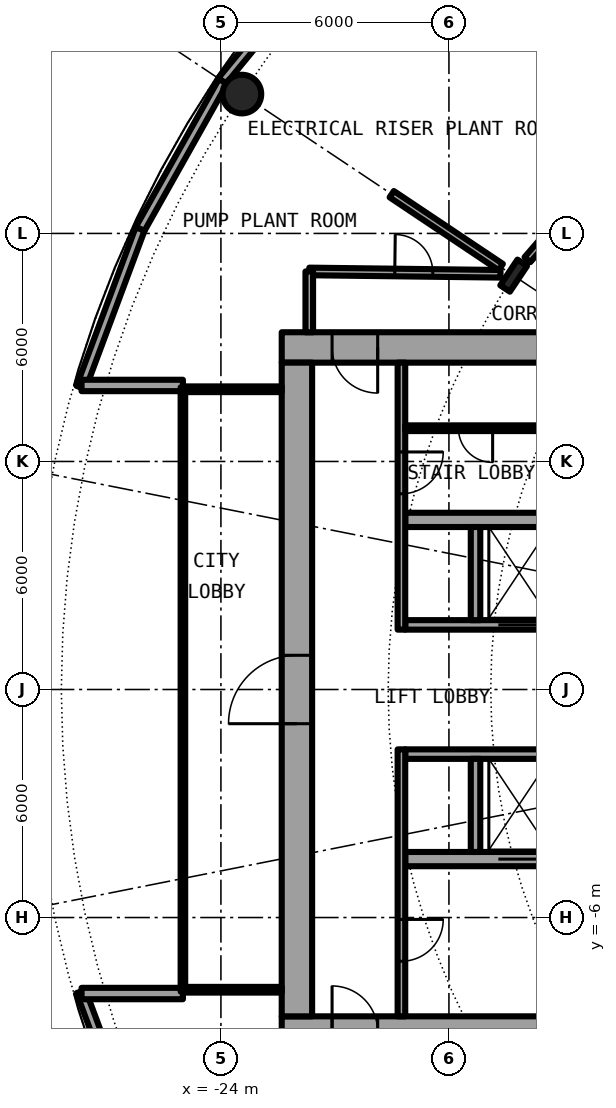
"""IFC4 building model, lengths in metres.
Left out: names, types, materials, properties, quantities, classifications, styles, units other than length and angle.
Written with IfcOpenShell. Run it as: python <this file> out.ifc"""

import sys

from ifc_helpers import new_model, si_unit, direction, frame, frame_2d, origin, origin_2d, place, context, subcontext, project, spatial, rectangle, hollow_circle, i_section, extrude, element, fill, save


model = new_model("IFC4")
c1 = context("Model", 3, precision=1e-05, world=origin(), true_north=direction((0.0, 1.0)))
c2 = subcontext(c1, "Body", "Model", "MODEL_VIEW")
j1 = project(units=[si_unit("LENGTHUNIT", "METRE"), si_unit("PLANEANGLEUNIT", "RADIAN")], contexts=[c1])
p1 = place(None, origin())
s1 = spatial("IfcSite", under=j1, at=p1, CompositionType="ELEMENT")
p2 = place(p1, origin())
s2 = spatial("IfcBuilding", under=s1, at=p2, CompositionType="ELEMENT")
p3 = place(p2, frame((0.0, 0.0, 18.3)))
s3 = spatial("IfcBuildingStorey", under=s2, at=p3, CompositionType="ELEMENT", Elevation=18.3)
p4 = place(p3, frame((-23.448, 15.667, 0.0), z_axis=(0.0, 0.0, 1.0), x_axis=(1.0, 0.0, 0.0)))
e1 = element("IfcColumn", 1, at=p4, inside=s3, PredefinedType="COLUMN", context=c2, shape_type="SweptSolid", body=[
    extrude(hollow_circle(Radius=0.508, WallThickness=0.05, at=origin_2d()), origin(), (0.0, 0.0, 1.0), 4.5),
])
p5 = place(p3, frame((-16.297, 10.889, 0.0), z_axis=(0.0, 0.0, 1.0), x_axis=(-0.831469612303, 0.55557023302, 0.0)))
e2 = element("IfcColumn", 2, at=p5, inside=s3, PredefinedType="COLUMN", context=c2, shape_type="SweptSolid", body=[
    extrude(i_section(OverallWidth=0.303, OverallDepth=0.814, WebThickness=0.021, FlangeThickness=0.04, FilletRadius=0.03, at=origin_2d()), origin(), (0.0, 0.0, 1.0), 4.5),
])
p6 = place(p3, frame((-20.382, 20.382, 0.0), z_axis=(0.0, 0.0, 1.0), x_axis=(-0.634403999748, -0.773001659186, 0.0)))
e3 = element("IfcWall", 3, at=p6, inside=s3, PredefinedType="SOLIDWALL", context=c2, shape_type="SweptSolid", body=[
    extrude(rectangle(XDim=5.651, YDim=0.25, at=frame_2d((2.825, 0.0))), origin(), (0.0, 0.0, 1.0), 4.15),
])
p7 = place(p3, frame((-27.682, -7.945, 0.0), z_axis=(0.0, 0.0, 1.0), x_axis=(0.349247811493, -0.937030397675, 0.0)))
e4 = element("IfcWall", 4, at=p7, inside=s3, PredefinedType="SOLIDWALL", context=c2, shape_type="SweptSolid", body=[
    extrude(rectangle(XDim=4.452, YDim=0.25, at=frame_2d((2.226, 0.0))), origin(), (0.0, 0.0, 1.0), 4.15),
])
p8 = place(p3, frame((-23.946, 16.0, 0.0), z_axis=(0.0, 0.0, 1.0), x_axis=(-0.489696356642, -0.871893042919, 0.0)))
e5 = element("IfcWall", 5, at=p8, inside=s3, PredefinedType="SOLIDWALL", context=c2, shape_type="SweptSolid", body=[
    extrude(rectangle(XDim=4.454, YDim=0.25, at=frame_2d((2.227, 0.0))), origin(), (0.0, 0.0, 1.0), 4.15),
])
p9 = place(p3, frame((-26.127, 12.117, 0.0), z_axis=(0.0, 0.0, 1.0), x_axis=(-0.349247811493, -0.937030397675, 0.0)))
e6 = element("IfcWall", 6, at=p9, inside=s3, PredefinedType="SOLIDWALL", context=c2, shape_type="SweptSolid", body=[
    extrude(rectangle(XDim=4.452, YDim=0.25, at=frame_2d((2.226, 0.0))), origin(), (0.0, 0.0, 1.0), 4.15),
])
for number, where, z_axis, x_axis in (
    (7, (-25.0, 8.0, 0.0), (0.0, 0.0, 1.0), (-1.0, 0.0, 0.0)),
    (8, (-25.0, -8.0, 0.0), (0.0, 0.0, 1.0), (-1.0, 0.0, 0.0)),
):
    element("IfcWall", number, at=place(p3, frame(where, z_axis=z_axis, x_axis=x_axis)), inside=s3, PredefinedType="SOLIDWALL", context=c2, shape_type="SweptSolid", body=[
        extrude(rectangle(XDim=2.667, YDim=0.3, at=frame_2d((1.333, 0.0))), origin(), (0.0, 0.0, 1.0), 4.15),
    ])
p10 = place(p3, frame((-22.4, -9.0, 0.0), z_axis=(0.0, 0.0, 1.0), x_axis=(1.0, 0.0, 0.0)))
e9 = element("IfcWall", 9, at=p10, inside=s3, PredefinedType="SHEAR", context=c2, shape_type="SweptSolid", body=[
    extrude(rectangle(XDim=14.2, YDim=0.8, at=frame_2d((7.1, 0.0))), origin(), (0.0, 0.0, 1.0), 4.5),
])
p11 = place(p10, frame((1.325, 0.0, 0.0)))
e10 = element("IfcOpeningElement", 10, at=p11, cuts=e9, PredefinedType="OPENING", context=c2, shape_type="SweptSolid", body=[
    extrude(rectangle(XDim=1.2, YDim=2.3, at=frame_2d((0.6, 1.15))), frame((0.0, 0.41, 0.0), z_axis=(0.0, -1.0, 0.0), x_axis=(1.0, 0.0, 0.0)), (0.0, 0.0, 1.0), 0.82),
])
p12 = place(p3, frame((-8.2, 9.0, 0.0), z_axis=(0.0, 0.0, 1.0), x_axis=(-1.0, 0.0, 0.0)))
e11 = element("IfcWall", 11, at=p12, inside=s3, PredefinedType="SHEAR", context=c2, shape_type="SweptSolid", body=[
    extrude(rectangle(XDim=14.2, YDim=0.8, at=frame_2d((7.1, 0.0))), origin(), (0.0, 0.0, 1.0), 4.5),
])
p13 = place(p12, frame((11.675, 0.0, 0.0)))
e12 = element("IfcOpeningElement", 12, at=p13, cuts=e11, PredefinedType="OPENING", context=c2, shape_type="SweptSolid", body=[
    extrude(rectangle(XDim=1.2, YDim=2.3, at=frame_2d((0.6, 1.15))), frame((0.0, 0.41, 0.0), z_axis=(0.0, -1.0, 0.0), x_axis=(1.0, 0.0, 0.0)), (0.0, 0.0, 1.0), 0.82),
])
p14 = place(p3, frame((-22.0, -8.6, 0.0), z_axis=(0.0, 0.0, 1.0), x_axis=(0.0, 1.0, 0.0)))
e13 = element("IfcWall", 13, at=p14, inside=s3, PredefinedType="SHEAR", context=c2, shape_type="SweptSolid", body=[
    extrude(rectangle(XDim=17.2, YDim=0.8, at=frame_2d((8.6, 0.0))), origin(), (0.0, 0.0, 1.0), 4.5),
])
p15 = place(p14, frame((7.7, 0.0, 0.0)))
e14 = element("IfcOpeningElement", 14, at=p15, cuts=e13, PredefinedType="OPENING", context=c2, shape_type="SweptSolid", body=[
    extrude(rectangle(XDim=1.8, YDim=2.3, at=frame_2d((0.9, 1.15))), frame((0.0, 0.41, 0.0), z_axis=(0.0, -1.0, 0.0), x_axis=(1.0, 0.0, 0.0)), (0.0, 0.0, 1.0), 0.82),
])
p16 = place(p3, frame((-9.0, -1.7, 0.0), z_axis=(0.0, 0.0, 1.0), x_axis=(-1.0, 0.0, 0.0)))
e15 = element("IfcWall", 15, at=p16, inside=s3, PredefinedType="SHEAR", context=c2, shape_type="SweptSolid", body=[
    extrude(rectangle(XDim=10.15, YDim=0.25, at=frame_2d((5.075, 0.0))), origin(), (0.0, 0.0, 1.0), 4.5),
])
p17 = place(p16, frame((0.387, 0.0, 0.0)))
e16 = element("IfcOpeningElement", 16, at=p17, cuts=e15, PredefinedType="OPENING", context=c2, shape_type="SweptSolid", body=[
    extrude(rectangle(XDim=1.1, YDim=2.3, at=frame_2d((0.55, 1.15))), frame((0.0, 0.135, 0.0), z_axis=(0.0, -1.0, 0.0), x_axis=(1.0, 0.0, 0.0)), (0.0, 0.0, 1.0), 0.27),
])
p18 = place(p16, frame((2.45, 0.0, 0.0)))
e17 = element("IfcOpeningElement", 17, at=p18, cuts=e15, PredefinedType="OPENING", context=c2, shape_type="SweptSolid", body=[
    extrude(rectangle(XDim=1.1, YDim=2.3, at=frame_2d((0.55, 1.15))), frame((0.0, 0.135, 0.0), z_axis=(0.0, -1.0, 0.0), x_axis=(1.0, 0.0, 0.0)), (0.0, 0.0, 1.0), 0.27),
])
p19 = place(p16, frame((4.45, 0.0, 0.0)))
e18 = element("IfcOpeningElement", 18, at=p19, cuts=e15, PredefinedType="OPENING", context=c2, shape_type="SweptSolid", body=[
    extrude(rectangle(XDim=1.1, YDim=2.3, at=frame_2d((0.55, 1.15))), frame((0.0, 0.135, 0.0), z_axis=(0.0, -1.0, 0.0), x_axis=(1.0, 0.0, 0.0)), (0.0, 0.0, 1.0), 0.27),
])
p20 = place(p3, frame((-9.0, -4.462, 0.0), z_axis=(0.0, 0.0, 1.0), x_axis=(-1.0, 0.0, 0.0)))
e19 = element("IfcWall", 19, at=p20, inside=s3, PredefinedType="SHEAR", context=c2, shape_type="SweptSolid", body=[
    extrude(rectangle(XDim=10.15, YDim=0.375, at=frame_2d((5.075, 0.0))), origin(), (0.0, 0.0, 1.0), 4.5),
])
p21 = place(p20, frame((6.6, 0.0, 0.0)))
e20 = element("IfcOpeningElement", 20, at=p21, cuts=e19, PredefinedType="OPENING", context=c2, shape_type="SweptSolid", body=[
    extrude(rectangle(XDim=1.1, YDim=2.3, at=frame_2d((0.55, 1.15))), frame((0.0, 0.198, 0.0), z_axis=(0.0, -1.0, 0.0), x_axis=(1.0, 0.0, 0.0)), (0.0, 0.0, 1.0), 0.395),
])
p22 = place(p3, frame((-17.3, -1.825, 0.0), z_axis=(0.0, 0.0, 1.0), x_axis=(0.0, -1.0, 0.0)))
e21 = element("IfcWall", 21, at=p22, inside=s3, PredefinedType="SOLIDWALL", context=c2, shape_type="SweptSolid", body=[
    extrude(rectangle(XDim=2.45, YDim=0.25, at=frame_2d((1.225, 0.0))), origin(), (0.0, 0.0, 1.0), 4.15),
])
p23 = place(p3, frame((-19.25, -1.575, 0.0), z_axis=(0.0, 0.0, 1.0), x_axis=(0.0, -1.0, 0.0)))
e22 = element("IfcWall", 22, at=p23, inside=s3, PredefinedType="SOLIDWALL", context=c2, shape_type="SweptSolid", body=[
    extrude(rectangle(XDim=7.025, YDim=0.2, at=frame_2d((3.513, 0.0))), origin(), (0.0, 0.0, 1.0), 4.15),
])
p24 = place(p23, frame((4.475, 0.0, 0.0)))
e23 = element("IfcOpeningElement", 23, at=p24, cuts=e22, PredefinedType="OPENING", context=c2, shape_type="SweptSolid", body=[
    extrude(rectangle(XDim=1.1, YDim=2.3, at=frame_2d((0.55, 1.15))), frame((0.0, 0.11, 0.0), z_axis=(0.0, -1.0, 0.0), x_axis=(1.0, 0.0, 0.0)), (0.0, 0.0, 1.0), 0.22),
])
p25 = place(p3, frame((-19.15, 1.7, 0.0), z_axis=(0.0, 0.0, 1.0), x_axis=(1.0, 0.0, 0.0)))
e24 = element("IfcWall", 24, at=p25, inside=s3, PredefinedType="SHEAR", context=c2, shape_type="SweptSolid", body=[
    extrude(rectangle(XDim=10.15, YDim=0.25, at=frame_2d((5.075, 0.0))), origin(), (0.0, 0.0, 1.0), 4.5),
])
p26 = place(p25, frame((2.45, 0.0, 0.0)))
e25 = element("IfcOpeningElement", 25, at=p26, cuts=e24, PredefinedType="OPENING", context=c2, shape_type="SweptSolid", body=[
    extrude(rectangle(XDim=1.1, YDim=2.3, at=frame_2d((0.55, 1.15))), frame((0.0, 0.135, 0.0), z_axis=(0.0, -1.0, 0.0), x_axis=(1.0, 0.0, 0.0)), (0.0, 0.0, 1.0), 0.27),
])
p27 = place(p25, frame((7.637, 0.0, 0.0)))
e26 = element("IfcOpeningElement", 26, at=p27, cuts=e24, PredefinedType="OPENING", context=c2, shape_type="SweptSolid", body=[
    extrude(rectangle(XDim=0.9, YDim=2.3, at=frame_2d((0.45, 1.15))), frame((0.0, 0.135, 0.0), z_axis=(0.0, -1.0, 0.0), x_axis=(1.0, 0.0, 0.0)), (0.0, 0.0, 1.0), 0.27),
])
p28 = place(p25, frame((4.625, 0.0, 0.0)))
e27 = element("IfcOpeningElement", 27, at=p28, cuts=e24, PredefinedType="OPENING", context=c2, shape_type="SweptSolid", body=[
    extrude(rectangle(XDim=0.9, YDim=2.3, at=frame_2d((0.45, 1.15))), frame((0.0, 0.135, 0.0), z_axis=(0.0, -1.0, 0.0), x_axis=(1.0, 0.0, 0.0)), (0.0, 0.0, 1.0), 0.27),
])
p29 = place(p3, frame((-9.0, 4.462, 0.0), z_axis=(0.0, 0.0, 1.0), x_axis=(-1.0, 0.0, 0.0)))
e28 = element("IfcWall", 28, at=p29, inside=s3, PredefinedType="SHEAR", context=c2, shape_type="SweptSolid", body=[
    extrude(rectangle(XDim=10.15, YDim=0.375, at=frame_2d((5.075, 0.0))), origin(), (0.0, 0.0, 1.0), 4.5),
])
p30 = place(p3, frame((-17.3, 1.825, 0.0), z_axis=(0.0, 0.0, 1.0), x_axis=(0.0, 1.0, 0.0)))
e29 = element("IfcWall", 29, at=p30, inside=s3, PredefinedType="SOLIDWALL", context=c2, shape_type="SweptSolid", body=[
    extrude(rectangle(XDim=2.45, YDim=0.25, at=frame_2d((1.225, 0.0))), origin(), (0.0, 0.0, 1.0), 4.15),
])
p31 = place(p3, frame((-19.25, 8.6, 0.0), z_axis=(0.0, 0.0, 1.0), x_axis=(0.0, -1.0, 0.0)))
e30 = element("IfcWall", 30, at=p31, inside=s3, PredefinedType="SOLIDWALL", context=c2, shape_type="SweptSolid", body=[
    extrude(rectangle(XDim=7.025, YDim=0.2, at=frame_2d((3.513, 0.0))), origin(), (0.0, 0.0, 1.0), 4.15),
])
p32 = place(p31, frame((2.35, 0.0, 0.0)))
e31 = element("IfcOpeningElement", 31, at=p32, cuts=e30, PredefinedType="OPENING", context=c2, shape_type="SweptSolid", body=[
    extrude(rectangle(XDim=1.1, YDim=2.3, at=frame_2d((0.55, 1.15))), frame((0.0, 0.11, 0.0), z_axis=(0.0, -1.0, 0.0), x_axis=(1.0, 0.0, 0.0)), (0.0, 0.0, 1.0), 0.22),
])
p33 = place(p3, frame((-15.45, 6.875, 0.0), z_axis=(0.0, 0.0, 1.0), x_axis=(-1.0, 0.0, 0.0)))
e32 = element("IfcWall", 32, at=p33, inside=s3, PredefinedType="PARTITIONING", context=c2, shape_type="SweptSolid", body=[
    extrude(rectangle(XDim=3.7, YDim=0.15, at=frame_2d((1.85, 0.0))), origin(), (0.0, 0.0, 1.0), 4.15),
])
p34 = place(p33, frame((1.4, 0.0, 0.0)))
e33 = element("IfcOpeningElement", 33, at=p34, cuts=e32, PredefinedType="OPENING", context=c2, shape_type="SweptSolid", body=[
    extrude(rectangle(XDim=0.9, YDim=2.3, at=frame_2d((0.45, 1.15))), frame((0.0, 0.085, 0.0), z_axis=(0.0, -1.0, 0.0), x_axis=(1.0, 0.0, 0.0)), (0.0, 0.0, 1.0), 0.17),
])
for number, where, z_axis, x_axis in (
    (34, (-22.4, 7.9, 0.0), (0.0, 0.0, 1.0), (-1.0, 0.0, 0.0)),
    (35, (-22.4, -7.9, 0.0), (0.0, 0.0, 1.0), (-1.0, 0.0, 0.0)),
):
    element("IfcWall", number, at=place(p3, frame(where, z_axis=z_axis, x_axis=x_axis)), inside=s3, PredefinedType="PARTITIONING", context=c2, shape_type="SweptSolid", body=[
        extrude(rectangle(XDim=2.54, YDim=0.15, at=frame_2d((1.27, 0.0))), origin(), (0.0, 0.0, 1.0), 4.15),
    ])
p35 = place(p3, frame((-25.0, 7.95, 0.0), z_axis=(0.0, 0.0, 1.0), x_axis=(0.0, -1.0, 0.0)))
e36 = element("IfcWall", 36, at=p35, inside=s3, PredefinedType="PARTITIONING", context=c2, shape_type="SweptSolid", body=[
    extrude(rectangle(XDim=15.9, YDim=0.12, at=frame_2d((7.95, 0.0))), origin(), (0.0, 0.0, 1.0), 4.15),
])
p36 = place(p35, frame((0.95, 0.0, 0.1)))
e37 = element("IfcOpeningElement", 37, at=p36, cuts=e36, PredefinedType="OPENING", context=c2, shape_type="SweptSolid", body=[
    extrude(rectangle(XDim=14.0, YDim=3.8, at=frame_2d((7.0, 1.9))), frame((0.0, 0.07, 0.0), z_axis=(0.0, -1.0, 0.0), x_axis=(1.0, 0.0, 0.0)), (0.0, 0.0, 1.0), 0.14),
])
p37 = place(p3, frame((-19.505, 13.033, 0.0), z_axis=(0.0, 0.0, 1.0), x_axis=(0.831331256958, -0.555777240632, 0.0)))
e38 = element("IfcWall", 38, at=p37, inside=s3, PredefinedType="PARTITIONING", context=c2, shape_type="SweptSolid", body=[
    extrude(rectangle(XDim=3.451, YDim=0.2, at=frame_2d((1.726, 0.0))), origin(), (0.0, 0.0, 1.0), 3.23),
])
p38 = place(p3, frame((-21.675, 11.0, 0.0), z_axis=(0.0, 0.0, 1.0), x_axis=(0.999924074118, -0.012322580895, 0.0)))
e39 = element("IfcWall", 39, at=p38, inside=s3, PredefinedType="PARTITIONING", context=c2, shape_type="SweptSolid", body=[
    extrude(rectangle(XDim=5.032, YDim=0.2, at=frame_2d((2.516, 0.0))), origin(), (0.0, 0.0, 1.0), 4.15),
])
p39 = place(p38, frame((2.25, 0.0, 0.0)))
e40 = element("IfcOpeningElement", 40, at=p39, cuts=e39, PredefinedType="OPENING", context=c2, shape_type="SweptSolid", body=[
    extrude(rectangle(XDim=1.0, YDim=2.3, at=frame_2d((0.5, 1.15))), frame((0.0, 0.11, 0.0), z_axis=(0.0, -1.0, 0.0), x_axis=(1.0, 0.0, 0.0)), (0.0, 0.0, 1.0), 0.22),
])
p40 = place(p3, frame((-15.935, 11.309, 0.0), z_axis=(0.0, 0.0, 1.0), x_axis=(0.653128497371, 0.757247097005, 0.0)))
e41 = element("IfcWall", 41, at=p40, inside=s3, PredefinedType="PARTITIONING", context=c2, shape_type="SweptSolid", body=[
    extrude(rectangle(XDim=4.244, YDim=0.2, at=frame_2d((2.122, 0.0))), origin(), (0.0, 0.0, 1.0), 3.73),
])
p41 = place(p3, frame((-21.675, 9.4, 0.0), z_axis=(0.0, 0.0, 1.0), x_axis=(0.0, 1.0, 0.0)))
e42 = element("IfcWall", 42, at=p41, inside=s3, PredefinedType="PARTITIONING", context=c2, shape_type="SweptSolid", body=[
    extrude(rectangle(XDim=1.6, YDim=0.2, at=frame_2d((0.8, 0.0))), origin(), (0.0, 0.0, 1.0), 4.15),
])
p42 = place(p21, origin())
e43 = element("IfcDoor", 43, at=p42, inside=s3, OperationType="DOUBLE_DOOR_SLIDING", PredefinedType="DOOR", context=c2, shape_type="SweptSolid", body=[
    extrude(rectangle(XDim=1.1, YDim=2.3, at=frame_2d((0.55, 1.15))), frame((0.0, 0.025, 0.0), z_axis=(0.0, -1.0, 0.0), x_axis=(1.0, 0.0, 0.0)), (0.0, 0.0, 1.0), 0.05),
])
fill(e20, e43)
p43 = place(p26, origin())
e44 = element("IfcDoor", 44, at=p43, inside=s3, OperationType="DOUBLE_DOOR_SLIDING", PredefinedType="DOOR", context=c2, shape_type="SweptSolid", body=[
    extrude(rectangle(XDim=1.1, YDim=2.3, at=frame_2d((0.55, 1.15))), frame((0.0, 0.025, 0.0), z_axis=(0.0, -1.0, 0.0), x_axis=(1.0, 0.0, 0.0)), (0.0, 0.0, 1.0), 0.05),
])
fill(e25, e44)
p44 = place(p34, origin())
e45 = element("IfcDoor", 45, at=p44, inside=s3, OperationType="SINGLE_SWING_LEFT", PredefinedType="DOOR", context=c2, shape_type="SweptSolid", body=[
    extrude(rectangle(XDim=0.9, YDim=2.3, at=frame_2d((0.45, 1.15))), frame((0.0, 0.025, 0.0), z_axis=(0.0, -1.0, 0.0), x_axis=(1.0, 0.0, 0.0)), (0.0, 0.0, 1.0), 0.05),
])
fill(e33, e45)
p45 = place(p24, origin())
e46 = element("IfcDoor", 46, at=p45, inside=s3, OperationType="SINGLE_SWING_LEFT", PredefinedType="DOOR", context=c2, shape_type="SweptSolid", body=[
    extrude(rectangle(XDim=1.1, YDim=2.3, at=frame_2d((0.55, 1.15))), frame((0.0, 0.025, 0.0), z_axis=(0.0, -1.0, 0.0), x_axis=(1.0, 0.0, 0.0)), (0.0, 0.0, 1.0), 0.05),
])
fill(e23, e46)
p46 = place(p32, origin())
e47 = element("IfcDoor", 47, at=p46, inside=s3, OperationType="SINGLE_SWING_RIGHT", PredefinedType="DOOR", context=c2, shape_type="SweptSolid", body=[
    extrude(rectangle(XDim=1.1, YDim=2.3, at=frame_2d((0.55, 1.15))), frame((0.0, 0.025, 0.0), z_axis=(0.0, -1.0, 0.0), x_axis=(1.0, 0.0, 0.0)), (0.0, 0.0, 1.0), 0.05),
])
fill(e31, e47)
p47 = place(p13, origin())
e48 = element("IfcDoor", 48, at=p47, inside=s3, OperationType="SINGLE_SWING_LEFT", PredefinedType="DOOR", context=c2, shape_type="SweptSolid", body=[
    extrude(rectangle(XDim=1.2, YDim=2.3, at=frame_2d((0.6, 1.15))), frame((0.0, 0.025, 0.0), z_axis=(0.0, -1.0, 0.0), x_axis=(1.0, 0.0, 0.0)), (0.0, 0.0, 1.0), 0.05),
])
fill(e12, e48)
p48 = place(p15, origin())
e49 = element("IfcDoor", 49, at=p48, inside=s3, OperationType="SINGLE_SWING_LEFT", PredefinedType="DOOR", context=c2, shape_type="SweptSolid", body=[
    extrude(rectangle(XDim=1.8, YDim=2.3, at=frame_2d((0.9, 1.15))), frame((0.0, 0.025, 0.0), z_axis=(0.0, -1.0, 0.0), x_axis=(1.0, 0.0, 0.0)), (0.0, 0.0, 1.0), 0.05),
])
fill(e14, e49)
p49 = place(p36, origin())
e50 = element("IfcWindow", 50, at=p49, inside=s3, PartitioningType="SINGLE_PANEL", PredefinedType="WINDOW", context=c2, shape_type="SweptSolid", body=[
    extrude(rectangle(XDim=14.0, YDim=3.8, at=frame_2d((7.0, 1.9))), frame((0.0, 0.03, 0.0), z_axis=(0.0, -1.0, 0.0), x_axis=(1.0, 0.0, 0.0)), (0.0, 0.0, 1.0), 0.06),
])
fill(e37, e50)
p50 = place(p39, origin())
e51 = element("IfcDoor", 51, at=p50, inside=s3, OperationType="SINGLE_SWING_RIGHT", PredefinedType="DOOR", context=c2, shape_type="SweptSolid", body=[
    extrude(rectangle(XDim=1.0, YDim=2.3, at=frame_2d((0.5, 1.15))), frame((0.0, 0.025, 0.0), z_axis=(0.0, -1.0, 0.0), x_axis=(1.0, 0.0, 0.0)), (0.0, 0.0, 1.0), 0.05),
])
fill(e40, e51)
save(model, sys.argv[1])
